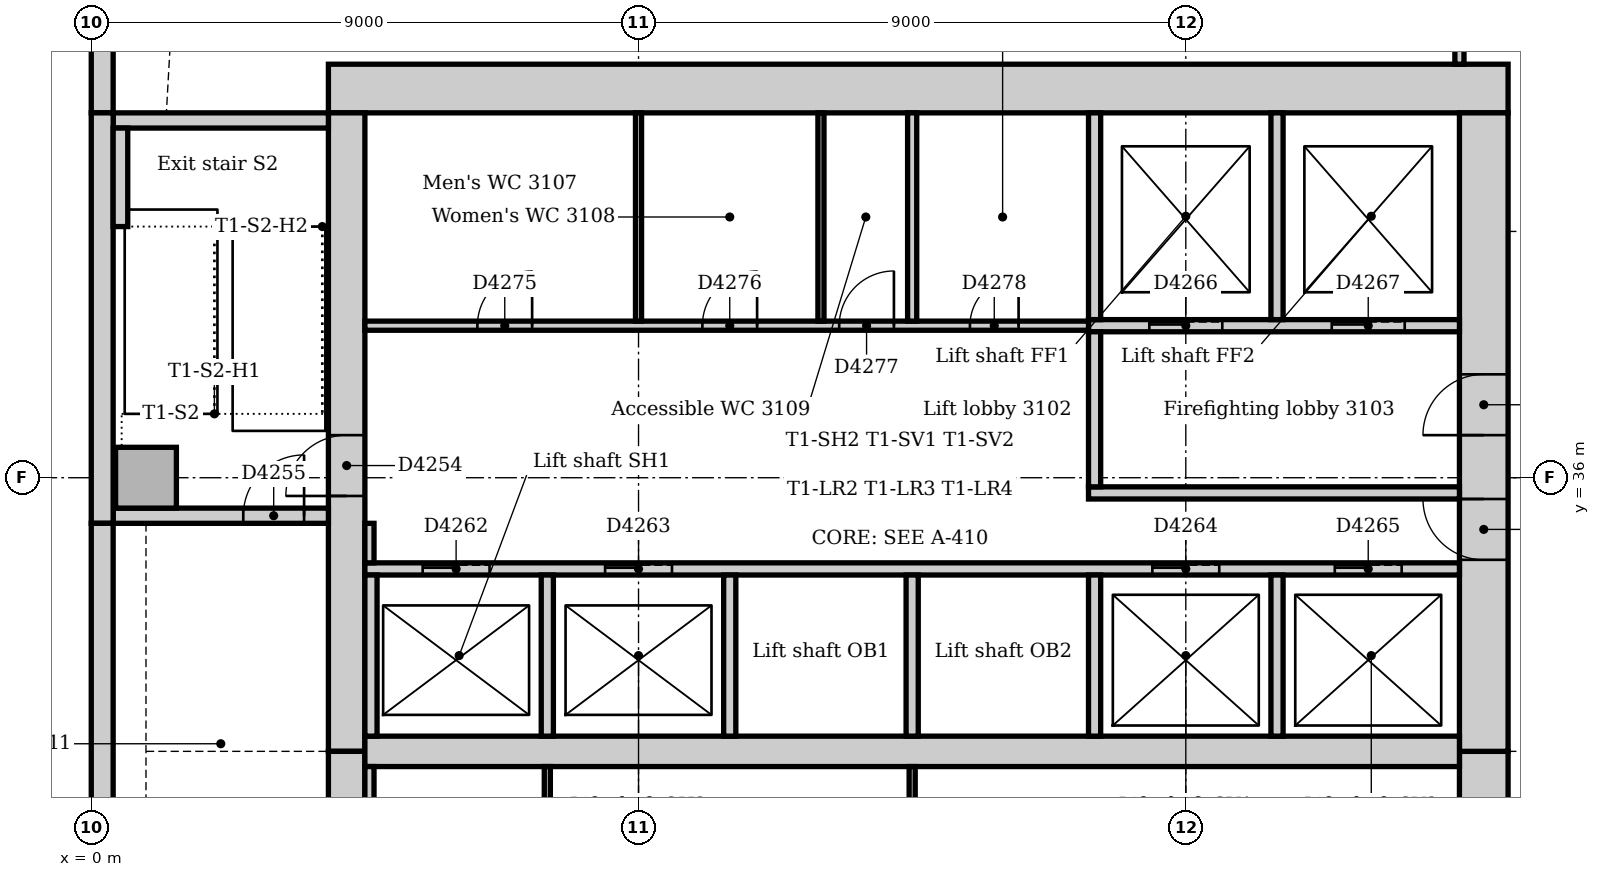
"""IFC4 building model, lengths in metres.
Left out: names, types, materials, properties, quantities, classifications, styles, units other than length and angle.
Written with IfcOpenShell. Run it as: python <this file> out.ifc"""

import sys

from ifc_helpers import new_model, si_unit, direction, frame, frame_2d, origin, origin_2d, place, context, subcontext, project, spatial, rectangle, extrude, element, fill, save


model = new_model("IFC4")
c1 = context("Model", 3, precision=1e-05, world=origin(), true_north=direction((0.0, 1.0)))
c2 = subcontext(c1, "Body", "Model", "MODEL_VIEW")
j1 = project(units=[si_unit("LENGTHUNIT", "METRE"), si_unit("PLANEANGLEUNIT", "RADIAN")], contexts=[c1])
p1 = place(None, origin())
s1 = spatial("IfcSite", under=j1, at=p1, CompositionType="ELEMENT")
p2 = place(p1, origin())
s2 = spatial("IfcBuilding", under=s1, at=p2, CompositionType="ELEMENT")
p3 = place(p2, frame((0.0, 0.0, 132.0)))
s3 = spatial("IfcBuildingStorey", under=s2, at=p3, CompositionType="ELEMENT", Elevation=132.0)
p4 = place(p3, frame((23.3, 42.4, 0.0), z_axis=(0.0, 0.0, 1.0), x_axis=(-1.0, 0.0, 0.0)))
e1 = element("IfcWall", 1, at=p4, inside=s3, PredefinedType="SOLIDWALL", context=c2, shape_type="SweptSolid", body=[
    extrude(rectangle(XDim=19.4, YDim=0.8, at=frame_2d((9.7, 0.0))), origin(), (0.0, 0.0, 1.0), 4.0),
])
p5 = place(p3, frame((22.9, 21.0, 0.0), z_axis=(0.0, 0.0, 1.0), x_axis=(0.0, 1.0, 0.0)))
e2 = element("IfcWall", 2, at=p5, inside=s3, PredefinedType="SOLIDWALL", context=c2, shape_type="SweptSolid", body=[
    extrude(rectangle(XDim=10.5, YDim=0.8, at=frame_2d((5.25, 0.0))), origin(), (0.0, 0.0, 1.0), 4.0),
])
p6 = place(p5, frame((4.35, 0.0, 0.0)))
e3 = element("IfcOpeningElement", 3, at=p6, cuts=e2, PredefinedType="OPENING", context=c2, shape_type="SweptSolid", body=[
    extrude(rectangle(XDim=1.8, YDim=2.1, at=frame_2d((0.9, 1.05))), frame((0.0, 0.41, 0.0), z_axis=(0.0, -1.0, 0.0), x_axis=(1.0, 0.0, 0.0)), (0.0, 0.0, 1.0), 0.82),
])
p7 = place(p3, frame((22.9, 31.5, 0.0), z_axis=(0.0, 0.0, 1.0), x_axis=(0.0, 1.0, 0.0)))
e4 = element("IfcWall", 4, at=p7, inside=s3, PredefinedType="SOLIDWALL", context=c2, shape_type="SweptSolid", body=[
    extrude(rectangle(XDim=10.5, YDim=0.8, at=frame_2d((5.25, 0.0))), origin(), (0.0, 0.0, 1.0), 4.0),
])
p8 = place(p7, frame((3.15, 0.0, 0.0)))
e5 = element("IfcOpeningElement", 5, at=p8, cuts=e4, PredefinedType="OPENING", context=c2, shape_type="SweptSolid", body=[
    extrude(rectangle(XDim=1.0, YDim=2.1, at=frame_2d((0.5, 1.05))), frame((0.0, 0.41, 0.0), z_axis=(0.0, -1.0, 0.0), x_axis=(1.0, 0.0, 0.0)), (0.0, 0.0, 1.0), 0.82),
])
p9 = place(p7, frame((5.2, 0.0, 0.0)))
e6 = element("IfcOpeningElement", 6, at=p9, cuts=e4, PredefinedType="OPENING", context=c2, shape_type="SweptSolid", body=[
    extrude(rectangle(XDim=1.0, YDim=2.1, at=frame_2d((0.5, 1.05))), frame((0.0, 0.41, 0.0), z_axis=(0.0, -1.0, 0.0), x_axis=(1.0, 0.0, 0.0)), (0.0, 0.0, 1.0), 0.82),
])
p10 = place(p3, frame((4.2, 42.0, 0.0), z_axis=(0.0, 0.0, 1.0), x_axis=(0.0, -1.0, 0.0)))
e7 = element("IfcWall", 7, at=p10, inside=s3, PredefinedType="SOLIDWALL", context=c2, shape_type="SweptSolid", body=[
    extrude(rectangle(XDim=10.5, YDim=0.6, at=frame_2d((5.25, 0.0))), origin(), (0.0, 0.0, 1.0), 4.0),
])
p11 = place(p10, frame((5.3, 0.0, 0.0)))
e8 = element("IfcOpeningElement", 8, at=p11, cuts=e7, PredefinedType="OPENING", context=c2, shape_type="SweptSolid", body=[
    extrude(rectangle(XDim=1.0, YDim=2.1, at=frame_2d((0.5, 1.05))), frame((0.0, 0.31, 0.0), z_axis=(0.0, -1.0, 0.0), x_axis=(1.0, 0.0, 0.0)), (0.0, 0.0, 1.0), 0.62),
])
p12 = place(p3, frame((4.2, 31.5, 0.0), z_axis=(0.0, 0.0, 1.0), x_axis=(0.0, -1.0, 0.0)))
e9 = element("IfcWall", 9, at=p12, inside=s3, PredefinedType="SOLIDWALL", context=c2, shape_type="SweptSolid", body=[
    extrude(rectangle(XDim=10.5, YDim=0.6, at=frame_2d((5.25, 0.0))), origin(), (0.0, 0.0, 1.0), 4.0),
])
p13 = place(p12, frame((4.25, 0.0, 0.0)))
e10 = element("IfcOpeningElement", 10, at=p13, cuts=e9, PredefinedType="OPENING", context=c2, shape_type="SweptSolid", body=[
    extrude(rectangle(XDim=1.0, YDim=2.1, at=frame_2d((0.5, 1.05))), frame((0.0, 0.31, 0.0), z_axis=(0.0, -1.0, 0.0), x_axis=(1.0, 0.0, 0.0)), (0.0, 0.0, 1.0), 0.62),
])
p14 = place(p3, frame((4.5, 31.5, 0.0), z_axis=(0.0, 0.0, 1.0), x_axis=(1.0, 0.0, 0.0)))
e11 = element("IfcWall", 11, at=p14, inside=s3, PredefinedType="SOLIDWALL", context=c2, shape_type="SweptSolid", body=[
    extrude(rectangle(XDim=18.0, YDim=0.5, at=frame_2d((9.0, 0.0))), origin(), (0.0, 0.0, 1.0), 4.0),
])
p15 = place(p3, frame((0.36, 35.375, 0.0), z_axis=(0.0, 0.0, 1.0), x_axis=(1.0, 0.0, 0.0)))
e12 = element("IfcWall", 12, at=p15, inside=s3, PredefinedType="SOLIDWALL", context=c2, shape_type="SweptSolid", body=[
    extrude(rectangle(XDim=3.54, YDim=0.25, at=frame_2d((1.77, 0.0))), origin(), (0.0, 0.0, 1.0), 4.0),
])
p16 = place(p15, frame((2.14, 0.0, 0.0)))
e13 = element("IfcOpeningElement", 13, at=p16, cuts=e12, PredefinedType="OPENING", context=c2, shape_type="SweptSolid", body=[
    extrude(rectangle(XDim=1.0, YDim=2.1, at=frame_2d((0.5, 1.05))), frame((0.0, 0.135, 0.0), z_axis=(0.0, -1.0, 0.0), x_axis=(1.0, 0.0, 0.0)), (0.0, 0.0, 1.0), 0.27),
])
p17 = place(p3, frame((3.9, 41.875, 0.0), z_axis=(0.0, 0.0, 1.0), x_axis=(-1.0, 0.0, 0.0)))
e14 = element("IfcWall", 14, at=p17, inside=s3, PredefinedType="SOLIDWALL", context=c2, shape_type="SweptSolid", body=[
    extrude(rectangle(XDim=3.54, YDim=0.25, at=frame_2d((1.77, 0.0))), origin(), (0.0, 0.0, 1.0), 4.0),
])
p18 = place(p3, frame((0.9, 36.0, 0.0), z_axis=(0.0, 0.0, 1.0), x_axis=(1.0, 0.0, 0.0)))
e15 = element("IfcColumn", 15, at=p18, inside=s3, PredefinedType="COLUMN", context=c2, shape_type="SweptSolid", body=[
    extrude(rectangle(XDim=1.0, YDim=1.0, at=origin_2d()), origin(), (0.0, 0.0, 1.0), 4.0),
])
p19 = place(p3, frame((0.18, 45.257, 0.0), z_axis=(0.0, 0.0, 1.0), x_axis=(0.0, -1.0, 0.0)))
e16 = element("IfcWall", 16, at=p19, inside=s3, PredefinedType="STANDARD", context=c2, shape_type="SweptSolid", body=[
    extrude(rectangle(XDim=3.257, YDim=0.36, at=frame_2d((1.629, 0.0))), origin(), (0.0, 0.0, 1.0), 3.85),
])
p20 = place(p3, frame((0.18, 42.0, 0.0), z_axis=(0.0, 0.0, 1.0), x_axis=(0.0, -1.0, 0.0)))
e17 = element("IfcWall", 17, at=p20, inside=s3, PredefinedType="STANDARD", context=c2, shape_type="SweptSolid", body=[
    extrude(rectangle(XDim=6.75, YDim=0.36, at=frame_2d((3.375, 0.0))), origin(), (0.0, 0.0, 1.0), 3.85),
])
p21 = place(p3, frame((0.18, 35.25, 0.0), z_axis=(0.0, 0.0, 1.0), x_axis=(0.0, -1.0, 0.0)))
e18 = element("IfcWall", 18, at=p21, inside=s3, PredefinedType="STANDARD", context=c2, shape_type="SweptSolid", body=[
    extrude(rectangle(XDim=7.5, YDim=0.36, at=frame_2d((3.75, 0.0))), origin(), (0.0, 0.0, 1.0), 3.85),
])
p22 = place(p3, frame((0.48, 40.13, 0.0), z_axis=(0.0, 0.0, 1.0), x_axis=(0.0, 1.0, 0.0)))
e19 = element("IfcWall", 19, at=p22, inside=s3, PredefinedType="STANDARD", context=c2, shape_type="SweptSolid", body=[
    extrude(rectangle(XDim=1.62, YDim=0.24, at=frame_2d((0.81, 0.0))), origin(), (0.0, 0.0, 1.0), 4.0),
])
p23 = place(p3, frame((16.4, 35.75, 0.0), z_axis=(0.0, 0.0, 1.0), x_axis=(1.0, 0.0, 0.0)))
e20 = element("IfcWall", 20, at=p23, inside=s3, PredefinedType="PARTITIONING", context=c2, shape_type="SweptSolid", body=[
    extrude(rectangle(XDim=6.1, YDim=0.2, at=frame_2d((3.05, 0.0))), origin(), (0.0, 0.0, 1.0), 3.85),
])
p24 = place(p3, frame((16.4, 38.5, 0.0), z_axis=(0.0, 0.0, 1.0), x_axis=(1.0, 0.0, 0.0)))
e21 = element("IfcWall", 21, at=p24, inside=s3, PredefinedType="PARTITIONING", context=c2, shape_type="SweptSolid", body=[
    extrude(rectangle(XDim=6.1, YDim=0.2, at=frame_2d((3.05, 0.0))), origin(), (0.0, 0.0, 1.0), 3.85),
])
p25 = place(p24, frame((1.0, 0.0, 0.0)))
e22 = element("IfcOpeningElement", 22, at=p25, cuts=e21, PredefinedType="OPENING", context=c2, shape_type="SweptSolid", body=[
    extrude(rectangle(XDim=1.2, YDim=2.1, at=frame_2d((0.6, 1.05))), frame((0.0, 0.11, 0.0), z_axis=(0.0, -1.0, 0.0), x_axis=(1.0, 0.0, 0.0)), (0.0, 0.0, 1.0), 0.22),
])
p26 = place(p24, frame((4.0, 0.0, 0.0)))
e23 = element("IfcOpeningElement", 23, at=p26, cuts=e21, PredefinedType="OPENING", context=c2, shape_type="SweptSolid", body=[
    extrude(rectangle(XDim=1.2, YDim=2.1, at=frame_2d((0.6, 1.05))), frame((0.0, 0.11, 0.0), z_axis=(0.0, -1.0, 0.0), x_axis=(1.0, 0.0, 0.0)), (0.0, 0.0, 1.0), 0.22),
])
p27 = place(p3, frame((16.5, 35.85, 0.0), z_axis=(0.0, 0.0, 1.0), x_axis=(0.0, 1.0, 0.0)))
e24 = element("IfcWall", 24, at=p27, inside=s3, PredefinedType="PARTITIONING", context=c2, shape_type="SweptSolid", body=[
    extrude(rectangle(XDim=2.55, YDim=0.2, at=frame_2d((1.275, 0.0))), origin(), (0.0, 0.0, 1.0), 3.85),
])
p28 = place(p3, frame((4.5, 34.5, 0.0), z_axis=(0.0, 0.0, 1.0), x_axis=(1.0, 0.0, 0.0)))
e25 = element("IfcWall", 25, at=p28, inside=s3, PredefinedType="PARTITIONING", context=c2, shape_type="SweptSolid", body=[
    extrude(rectangle(XDim=18.0, YDim=0.2, at=frame_2d((9.0, 0.0))), origin(), (0.0, 0.0, 1.0), 3.85),
])
p29 = place(p28, frame((0.95, 0.0, 0.0)))
e26 = element("IfcOpeningElement", 26, at=p29, cuts=e25, PredefinedType="OPENING", context=c2, shape_type="SweptSolid", body=[
    extrude(rectangle(XDim=1.1, YDim=2.1, at=frame_2d((0.55, 1.05))), frame((0.0, 0.11, 0.0), z_axis=(0.0, -1.0, 0.0), x_axis=(1.0, 0.0, 0.0)), (0.0, 0.0, 1.0), 0.22),
])
p30 = place(p28, frame((3.95, 0.0, 0.0)))
e27 = element("IfcOpeningElement", 27, at=p30, cuts=e25, PredefinedType="OPENING", context=c2, shape_type="SweptSolid", body=[
    extrude(rectangle(XDim=1.1, YDim=2.1, at=frame_2d((0.55, 1.05))), frame((0.0, 0.11, 0.0), z_axis=(0.0, -1.0, 0.0), x_axis=(1.0, 0.0, 0.0)), (0.0, 0.0, 1.0), 0.22),
])
p31 = place(p28, frame((12.95, 0.0, 0.0)))
e28 = element("IfcOpeningElement", 28, at=p31, cuts=e25, PredefinedType="OPENING", context=c2, shape_type="SweptSolid", body=[
    extrude(rectangle(XDim=1.1, YDim=2.1, at=frame_2d((0.55, 1.05))), frame((0.0, 0.11, 0.0), z_axis=(0.0, -1.0, 0.0), x_axis=(1.0, 0.0, 0.0)), (0.0, 0.0, 1.0), 0.22),
])
p32 = place(p28, frame((15.95, 0.0, 0.0)))
e29 = element("IfcOpeningElement", 29, at=p32, cuts=e25, PredefinedType="OPENING", context=c2, shape_type="SweptSolid", body=[
    extrude(rectangle(XDim=1.1, YDim=2.1, at=frame_2d((0.55, 1.05))), frame((0.0, 0.11, 0.0), z_axis=(0.0, -1.0, 0.0), x_axis=(1.0, 0.0, 0.0)), (0.0, 0.0, 1.0), 0.22),
])
for number, where, z_axis, x_axis in (
    (30, (16.5, 38.6, 0.0), (0.0, 0.0, 1.0), (0.0, 1.0, 0.0)),
    (31, (19.5, 38.6, 0.0), (0.0, 0.0, 1.0), (0.0, 1.0, 0.0)),
):
    element("IfcWall", number, at=place(p3, frame(where, z_axis=z_axis, x_axis=x_axis)), inside=s3, PredefinedType="PARTITIONING", context=c2, shape_type="SweptSolid", body=[
        extrude(rectangle(XDim=3.4, YDim=0.2, at=frame_2d((1.7, 0.0))), origin(), (0.0, 0.0, 1.0), 3.85),
    ])
for number, where, z_axis, x_axis in (
    (32, (4.6, 31.75, 0.0), (0.0, 0.0, 1.0), (0.0, 1.0, 0.0)),
    (33, (7.5, 31.75, 0.0), (0.0, 0.0, 1.0), (0.0, 1.0, 0.0)),
    (34, (10.5, 31.75, 0.0), (0.0, 0.0, 1.0), (0.0, 1.0, 0.0)),
    (35, (13.5, 31.75, 0.0), (0.0, 0.0, 1.0), (0.0, 1.0, 0.0)),
    (36, (16.5, 31.75, 0.0), (0.0, 0.0, 1.0), (0.0, 1.0, 0.0)),
    (37, (19.5, 31.75, 0.0), (0.0, 0.0, 1.0), (0.0, 1.0, 0.0)),
):
    element("IfcWall", number, at=place(p3, frame(where, z_axis=z_axis, x_axis=x_axis)), inside=s3, PredefinedType="PARTITIONING", context=c2, shape_type="SweptSolid", body=[
        extrude(rectangle(XDim=2.65, YDim=0.2, at=frame_2d((1.325, 0.0))), origin(), (0.0, 0.0, 1.0), 3.85),
    ])
p33 = place(p3, frame((4.5, 38.5, 0.0), z_axis=(0.0, 0.0, 1.0), x_axis=(1.0, 0.0, 0.0)))
e38 = element("IfcWall", 38, at=p33, inside=s3, PredefinedType="PARTITIONING", context=c2, shape_type="SweptSolid", body=[
    extrude(rectangle(XDim=11.9, YDim=0.15, at=frame_2d((5.95, 0.0))), origin(), (0.0, 0.0, 1.0), 3.85),
])
p34 = place(p33, frame((1.85, 0.0, 0.0)))
e39 = element("IfcOpeningElement", 39, at=p34, cuts=e38, PredefinedType="OPENING", context=c2, shape_type="SweptSolid", body=[
    extrude(rectangle(XDim=0.9, YDim=2.1, at=frame_2d((0.45, 1.05))), frame((0.0, 0.085, 0.0), z_axis=(0.0, -1.0, 0.0), x_axis=(1.0, 0.0, 0.0)), (0.0, 0.0, 1.0), 0.17),
])
p35 = place(p33, frame((5.55, 0.0, 0.0)))
e40 = element("IfcOpeningElement", 40, at=p35, cuts=e38, PredefinedType="OPENING", context=c2, shape_type="SweptSolid", body=[
    extrude(rectangle(XDim=0.9, YDim=2.1, at=frame_2d((0.45, 1.05))), frame((0.0, 0.085, 0.0), z_axis=(0.0, -1.0, 0.0), x_axis=(1.0, 0.0, 0.0)), (0.0, 0.0, 1.0), 0.17),
])
p36 = place(p33, frame((7.8, 0.0, 0.0)))
e41 = element("IfcOpeningElement", 41, at=p36, cuts=e38, PredefinedType="OPENING", context=c2, shape_type="SweptSolid", body=[
    extrude(rectangle(XDim=0.9, YDim=2.1, at=frame_2d((0.45, 1.05))), frame((0.0, 0.085, 0.0), z_axis=(0.0, -1.0, 0.0), x_axis=(1.0, 0.0, 0.0)), (0.0, 0.0, 1.0), 0.17),
])
p37 = place(p33, frame((9.95, 0.0, 0.0)))
e42 = element("IfcOpeningElement", 42, at=p37, cuts=e38, PredefinedType="OPENING", context=c2, shape_type="SweptSolid", body=[
    extrude(rectangle(XDim=0.8, YDim=2.1, at=frame_2d((0.4, 1.05))), frame((0.0, 0.085, 0.0), z_axis=(0.0, -1.0, 0.0), x_axis=(1.0, 0.0, 0.0)), (0.0, 0.0, 1.0), 0.17),
])
p38 = place(p3, frame((4.575, 28.575, 0.0), z_axis=(0.0, 0.0, 1.0), x_axis=(0.0, 1.0, 0.0)))
e43 = element("IfcWall", 43, at=p38, inside=s3, PredefinedType="PARTITIONING", context=c2, shape_type="SweptSolid", body=[
    extrude(rectangle(XDim=2.675, YDim=0.15, at=frame_2d((1.337, 0.0))), origin(), (0.0, 0.0, 1.0), 3.85),
])
p39 = place(p3, frame((22.5, 42.8, 0.0), z_axis=(0.0, 0.0, 1.0), x_axis=(0.0, 1.0, 0.0)))
e44 = element("IfcWall", 44, at=p39, inside=s3, PredefinedType="PARTITIONING", context=c2, shape_type="SweptSolid", body=[
    extrude(rectangle(XDim=1.725, YDim=0.15, at=frame_2d((0.863, 0.0))), origin(), (0.0, 0.0, 1.0), 3.85),
])
p40 = place(p3, frame((4.575, 34.6, 0.0), z_axis=(0.0, 0.0, 1.0), x_axis=(0.0, 1.0, 0.0)))
e45 = element("IfcWall", 45, at=p40, inside=s3, PredefinedType="PARTITIONING", context=c2, shape_type="SweptSolid", body=[
    extrude(rectangle(XDim=0.65, YDim=0.15, at=frame_2d((0.325, 0.0))), origin(), (0.0, 0.0, 1.0), 3.85),
])
p41 = place(p3, frame((13.5, 38.575, 0.0), z_axis=(0.0, 0.0, 1.0), x_axis=(0.0, 1.0, 0.0)))
e46 = element("IfcWall", 46, at=p41, inside=s3, PredefinedType="PARTITIONING", context=c2, shape_type="SweptSolid", body=[
    extrude(rectangle(XDim=3.425, YDim=0.15, at=frame_2d((1.712, 0.0))), origin(), (0.0, 0.0, 1.0), 3.85),
])
for number, where, z_axis, x_axis in (
    (47, (9.0, 38.575, 0.0), (0.0, 0.0, 1.0), (0.0, 1.0, 0.0)),
    (48, (12.0, 38.575, 0.0), (0.0, 0.0, 1.0), (0.0, 1.0, 0.0)),
):
    element("IfcWall", number, at=place(p3, frame(where, z_axis=z_axis, x_axis=x_axis)), inside=s3, PredefinedType="PARTITIONING", context=c2, shape_type="SweptSolid", body=[
        extrude(rectangle(XDim=3.425, YDim=0.1, at=frame_2d((1.712, 0.0))), origin(), (0.0, 0.0, 1.0), 3.85),
    ])
for number, where, z_axis, x_axis in (
    (49, (7.5, 28.575, 0.0), (0.0, 0.0, 1.0), (0.0, 1.0, 0.0)),
    (50, (13.5, 28.575, 0.0), (0.0, 0.0, 1.0), (0.0, 1.0, 0.0)),
):
    element("IfcWall", number, at=place(p3, frame(where, z_axis=z_axis, x_axis=x_axis)), inside=s3, PredefinedType="PARTITIONING", context=c2, shape_type="SweptSolid", body=[
        extrude(rectangle(XDim=2.675, YDim=0.1, at=frame_2d((1.337, 0.0))), origin(), (0.0, 0.0, 1.0), 3.85),
    ])
p42 = place(p11, frame((1.0, 0.0, 0.0), z_axis=(0.0, 0.0, 1.0), x_axis=(-1.0, 0.0, 0.0)))
e51 = element("IfcDoor", 51, at=p42, inside=s3, OperationType="SINGLE_SWING_LEFT", PredefinedType="DOOR", context=c2, shape_type="SweptSolid", body=[
    extrude(rectangle(XDim=1.0, YDim=2.1, at=frame_2d((0.5, 1.05))), frame((0.0, 0.025, 0.0), z_axis=(0.0, -1.0, 0.0), x_axis=(1.0, 0.0, 0.0)), (0.0, 0.0, 1.0), 0.05),
])
fill(e8, e51)
p43 = place(p16, origin())
e52 = element("IfcDoor", 52, at=p43, inside=s3, OperationType="SINGLE_SWING_RIGHT", PredefinedType="DOOR", context=c2, shape_type="SweptSolid", body=[
    extrude(rectangle(XDim=1.0, YDim=2.1, at=frame_2d((0.5, 1.05))), frame((0.0, 0.025, 0.0), z_axis=(0.0, -1.0, 0.0), x_axis=(1.0, 0.0, 0.0)), (0.0, 0.0, 1.0), 0.05),
])
fill(e13, e52)
p44 = place(p29, origin())
e53 = element("IfcDoor", 53, at=p44, inside=s3, OperationType="SLIDING_TO_LEFT", PredefinedType="DOOR", context=c2, shape_type="SweptSolid", body=[
    extrude(rectangle(XDim=1.1, YDim=2.1, at=frame_2d((0.55, 1.05))), frame((0.0, 0.025, 0.0), z_axis=(0.0, -1.0, 0.0), x_axis=(1.0, 0.0, 0.0)), (0.0, 0.0, 1.0), 0.05),
])
fill(e26, e53)
p45 = place(p30, origin())
e54 = element("IfcDoor", 54, at=p45, inside=s3, OperationType="SLIDING_TO_LEFT", PredefinedType="DOOR", context=c2, shape_type="SweptSolid", body=[
    extrude(rectangle(XDim=1.1, YDim=2.1, at=frame_2d((0.55, 1.05))), frame((0.0, 0.025, 0.0), z_axis=(0.0, -1.0, 0.0), x_axis=(1.0, 0.0, 0.0)), (0.0, 0.0, 1.0), 0.05),
])
fill(e27, e54)
p46 = place(p31, origin())
e55 = element("IfcDoor", 55, at=p46, inside=s3, OperationType="SLIDING_TO_LEFT", PredefinedType="DOOR", context=c2, shape_type="SweptSolid", body=[
    extrude(rectangle(XDim=1.1, YDim=2.1, at=frame_2d((0.55, 1.05))), frame((0.0, 0.025, 0.0), z_axis=(0.0, -1.0, 0.0), x_axis=(1.0, 0.0, 0.0)), (0.0, 0.0, 1.0), 0.05),
])
fill(e28, e55)
p47 = place(p32, origin())
e56 = element("IfcDoor", 56, at=p47, inside=s3, OperationType="SLIDING_TO_LEFT", PredefinedType="DOOR", context=c2, shape_type="SweptSolid", body=[
    extrude(rectangle(XDim=1.1, YDim=2.1, at=frame_2d((0.55, 1.05))), frame((0.0, 0.025, 0.0), z_axis=(0.0, -1.0, 0.0), x_axis=(1.0, 0.0, 0.0)), (0.0, 0.0, 1.0), 0.05),
])
fill(e29, e56)
p48 = place(p25, origin())
e57 = element("IfcDoor", 57, at=p48, inside=s3, OperationType="SLIDING_TO_LEFT", PredefinedType="DOOR", context=c2, shape_type="SweptSolid", body=[
    extrude(rectangle(XDim=1.2, YDim=2.1, at=frame_2d((0.6, 1.05))), frame((0.0, 0.025, 0.0), z_axis=(0.0, -1.0, 0.0), x_axis=(1.0, 0.0, 0.0)), (0.0, 0.0, 1.0), 0.05),
])
fill(e22, e57)
p49 = place(p26, origin())
e58 = element("IfcDoor", 58, at=p49, inside=s3, OperationType="SLIDING_TO_LEFT", PredefinedType="DOOR", context=c2, shape_type="SweptSolid", body=[
    extrude(rectangle(XDim=1.2, YDim=2.1, at=frame_2d((0.6, 1.05))), frame((0.0, 0.025, 0.0), z_axis=(0.0, -1.0, 0.0), x_axis=(1.0, 0.0, 0.0)), (0.0, 0.0, 1.0), 0.05),
])
fill(e23, e58)
p50 = place(p8, origin())
e59 = element("IfcDoor", 59, at=p50, inside=s3, OperationType="SINGLE_SWING_RIGHT", PredefinedType="DOOR", context=c2, shape_type="SweptSolid", body=[
    extrude(rectangle(XDim=1.0, YDim=2.1, at=frame_2d((0.5, 1.05))), frame((0.0, 0.025, 0.0), z_axis=(0.0, -1.0, 0.0), x_axis=(1.0, 0.0, 0.0)), (0.0, 0.0, 1.0), 0.05),
])
fill(e5, e59)
p51 = place(p9, origin())
e60 = element("IfcDoor", 60, at=p51, inside=s3, OperationType="SINGLE_SWING_LEFT", PredefinedType="DOOR", context=c2, shape_type="SweptSolid", body=[
    extrude(rectangle(XDim=1.0, YDim=2.1, at=frame_2d((0.5, 1.05))), frame((0.0, 0.025, 0.0), z_axis=(0.0, -1.0, 0.0), x_axis=(1.0, 0.0, 0.0)), (0.0, 0.0, 1.0), 0.05),
])
fill(e6, e60)
p52 = place(p34, origin())
e61 = element("IfcDoor", 61, at=p52, inside=s3, OperationType="SINGLE_SWING_RIGHT", PredefinedType="DOOR", context=c2, shape_type="SweptSolid", body=[
    extrude(rectangle(XDim=0.9, YDim=2.1, at=frame_2d((0.45, 1.05))), frame((0.0, 0.025, 0.0), z_axis=(0.0, -1.0, 0.0), x_axis=(1.0, 0.0, 0.0)), (0.0, 0.0, 1.0), 0.05),
])
fill(e39, e61)
p53 = place(p35, origin())
e62 = element("IfcDoor", 62, at=p53, inside=s3, OperationType="SINGLE_SWING_RIGHT", PredefinedType="DOOR", context=c2, shape_type="SweptSolid", body=[
    extrude(rectangle(XDim=0.9, YDim=2.1, at=frame_2d((0.45, 1.05))), frame((0.0, 0.025, 0.0), z_axis=(0.0, -1.0, 0.0), x_axis=(1.0, 0.0, 0.0)), (0.0, 0.0, 1.0), 0.05),
])
fill(e40, e62)
p54 = place(p36, origin())
e63 = element("IfcDoor", 63, at=p54, inside=s3, OperationType="SINGLE_SWING_RIGHT", PredefinedType="DOOR", context=c2, shape_type="SweptSolid", body=[
    extrude(rectangle(XDim=0.9, YDim=2.1, at=frame_2d((0.45, 1.05))), frame((0.0, 0.025, 0.0), z_axis=(0.0, -1.0, 0.0), x_axis=(1.0, 0.0, 0.0)), (0.0, 0.0, 1.0), 0.05),
])
fill(e41, e63)
p55 = place(p37, origin())
e64 = element("IfcDoor", 64, at=p55, inside=s3, OperationType="SINGLE_SWING_RIGHT", PredefinedType="DOOR", context=c2, shape_type="SweptSolid", body=[
    extrude(rectangle(XDim=0.8, YDim=2.1, at=frame_2d((0.4, 1.05))), frame((0.0, 0.025, 0.0), z_axis=(0.0, -1.0, 0.0), x_axis=(1.0, 0.0, 0.0)), (0.0, 0.0, 1.0), 0.05),
])
fill(e42, e64)
save(model, sys.argv[1])
